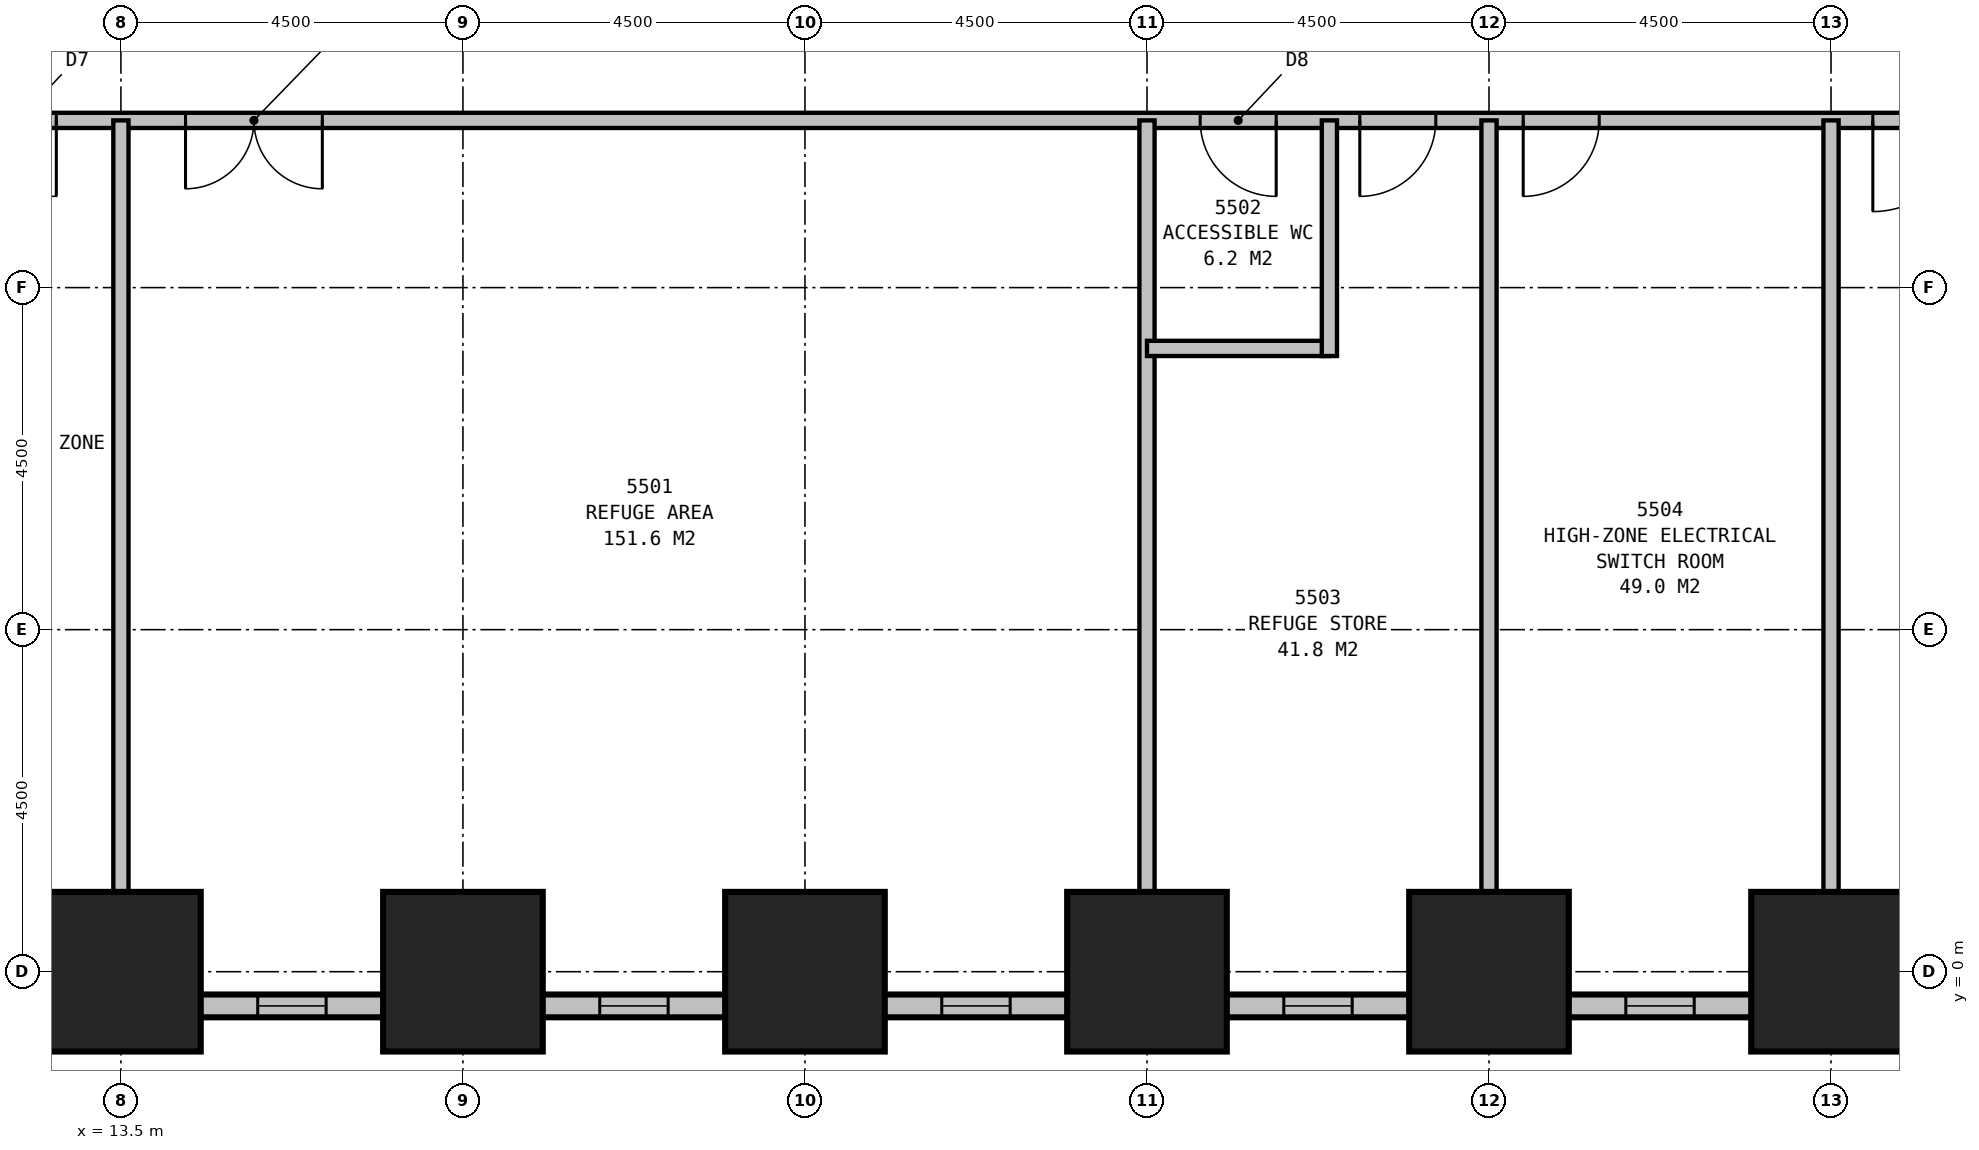
"""IFC4 building model, lengths in metres.
Left out: names, types, materials, properties, quantities, classifications, styles, units other than length and angle.
Written with IfcOpenShell. Run it as: python <this file> out.ifc"""

import sys

from ifc_helpers import new_model, si_unit, direction, frame, frame_2d, origin, origin_2d, place, context, subcontext, project, spatial, rectangle, extrude, element, fill, save


model = new_model("IFC4")
c1 = context("Model", 3, precision=1e-05, world=origin(), true_north=direction((0.0, 1.0)))
c2 = subcontext(c1, "Body", "Model", "MODEL_VIEW")
j1 = project(units=[si_unit("LENGTHUNIT", "METRE"), si_unit("PLANEANGLEUNIT", "RADIAN")], contexts=[c1])
p1 = place(None, origin())
s1 = spatial("IfcSite", under=j1, at=p1, CompositionType="ELEMENT")
p2 = place(p1, origin())
s2 = spatial("IfcBuilding", under=s1, at=p2, CompositionType="ELEMENT")
p3 = place(p2, frame((0.0, 0.0, 211.4)))
s3 = spatial("IfcBuildingStorey", under=s2, at=p3, CompositionType="ELEMENT", Elevation=211.4)
for number, where, z_axis, x_axis in (
    (1, (13.5, 0.0, 0.0), (0.0, 0.0, 1.0), (1.0, 0.0, 0.0)),
    (2, (18.0, 0.0, 0.0), (0.0, 0.0, 1.0), (1.0, 0.0, 0.0)),
    (3, (22.5, 0.0, 0.0), (0.0, 0.0, 1.0), (1.0, 0.0, 0.0)),
    (4, (27.0, 0.0, 0.0), (0.0, 0.0, 1.0), (1.0, 0.0, 0.0)),
    (5, (31.5, 0.0, 0.0), (0.0, 0.0, 1.0), (1.0, 0.0, 0.0)),
    (6, (36.0, 0.0, 0.0), (0.0, 0.0, 1.0), (1.0, 0.0, 0.0)),
):
    element("IfcColumn", number, at=place(p3, frame(where, z_axis=z_axis, x_axis=x_axis)), inside=s3, PredefinedType="COLUMN", context=c2, shape_type="SweptSolid", body=[
        extrude(rectangle(XDim=2.1, YDim=2.1, at=origin_2d()), origin(), (0.0, 0.0, 1.0), 6.0),
    ])
p4 = place(p3, frame((8.4, -0.45, 0.0), z_axis=(0.0, 0.0, 1.0), x_axis=(1.0, 0.0, 0.0)))
e7 = element("IfcWall", 7, at=p4, inside=s3, PredefinedType="STANDARD", context=c2, shape_type="SweptSolid", body=[
    extrude(rectangle(XDim=37.2, YDim=0.3, at=frame_2d((18.6, 0.0))), origin(), (0.0, 0.0, 1.0), 4.6),
])
p5 = place(p4, frame((2.4, 0.0, 0.5)))
e8 = element("IfcOpeningElement", 8, at=p5, cuts=e7, PredefinedType="OPENING", context=c2, shape_type="SweptSolid", body=[
    extrude(rectangle(XDim=0.9, YDim=1.2, at=frame_2d((0.45, 0.6))), frame((0.0, 0.16, 0.0), z_axis=(0.0, -1.0, 0.0), x_axis=(1.0, 0.0, 0.0)), (0.0, 0.0, 1.0), 0.32),
])
p6 = place(p4, frame((6.9, 0.0, 0.5)))
e9 = element("IfcOpeningElement", 9, at=p6, cuts=e7, PredefinedType="OPENING", context=c2, shape_type="SweptSolid", body=[
    extrude(rectangle(XDim=0.9, YDim=1.2, at=frame_2d((0.45, 0.6))), frame((0.0, 0.16, 0.0), z_axis=(0.0, -1.0, 0.0), x_axis=(1.0, 0.0, 0.0)), (0.0, 0.0, 1.0), 0.32),
])
p7 = place(p4, frame((11.4, 0.0, 0.5)))
e10 = element("IfcOpeningElement", 10, at=p7, cuts=e7, PredefinedType="OPENING", context=c2, shape_type="SweptSolid", body=[
    extrude(rectangle(XDim=0.9, YDim=1.2, at=frame_2d((0.45, 0.6))), frame((0.0, 0.16, 0.0), z_axis=(0.0, -1.0, 0.0), x_axis=(1.0, 0.0, 0.0)), (0.0, 0.0, 1.0), 0.32),
])
p8 = place(p4, frame((15.9, 0.0, 0.5)))
e11 = element("IfcOpeningElement", 11, at=p8, cuts=e7, PredefinedType="OPENING", context=c2, shape_type="SweptSolid", body=[
    extrude(rectangle(XDim=0.9, YDim=1.2, at=frame_2d((0.45, 0.6))), frame((0.0, 0.16, 0.0), z_axis=(0.0, -1.0, 0.0), x_axis=(1.0, 0.0, 0.0)), (0.0, 0.0, 1.0), 0.32),
])
p9 = place(p4, frame((20.4, 0.0, 0.5)))
e12 = element("IfcOpeningElement", 12, at=p9, cuts=e7, PredefinedType="OPENING", context=c2, shape_type="SweptSolid", body=[
    extrude(rectangle(XDim=0.9, YDim=1.2, at=frame_2d((0.45, 0.6))), frame((0.0, 0.16, 0.0), z_axis=(0.0, -1.0, 0.0), x_axis=(1.0, 0.0, 0.0)), (0.0, 0.0, 1.0), 0.32),
])
p10 = place(p4, frame((24.9, 0.0, 0.5)))
e13 = element("IfcOpeningElement", 13, at=p10, cuts=e7, PredefinedType="OPENING", context=c2, shape_type="SweptSolid", body=[
    extrude(rectangle(XDim=0.9, YDim=1.2, at=frame_2d((0.45, 0.6))), frame((0.0, 0.16, 0.0), z_axis=(0.0, -1.0, 0.0), x_axis=(1.0, 0.0, 0.0)), (0.0, 0.0, 1.0), 0.32),
])
p11 = place(p4, frame((29.4, 0.0, 0.5)))
e14 = element("IfcOpeningElement", 14, at=p11, cuts=e7, PredefinedType="OPENING", context=c2, shape_type="SweptSolid", body=[
    extrude(rectangle(XDim=0.9, YDim=1.2, at=frame_2d((0.45, 0.6))), frame((0.0, 0.16, 0.0), z_axis=(0.0, -1.0, 0.0), x_axis=(1.0, 0.0, 0.0)), (0.0, 0.0, 1.0), 0.32),
])
p12 = place(p4, frame((33.9, 0.0, 0.5)))
e15 = element("IfcOpeningElement", 15, at=p12, cuts=e7, PredefinedType="OPENING", context=c2, shape_type="SweptSolid", body=[
    extrude(rectangle(XDim=0.9, YDim=1.2, at=frame_2d((0.45, 0.6))), frame((0.0, 0.16, 0.0), z_axis=(0.0, -1.0, 0.0), x_axis=(1.0, 0.0, 0.0)), (0.0, 0.0, 1.0), 0.32),
])
p13 = place(p3, frame((11.2, 11.2, 0.0), z_axis=(0.0, 0.0, 1.0), x_axis=(1.0, 0.0, 0.0)))
e16 = element("IfcWall", 16, at=p13, inside=s3, PredefinedType="PARTITIONING", context=c2, shape_type="SweptSolid", body=[
    extrude(rectangle(XDim=27.1, YDim=0.2, at=frame_2d((13.55, 0.0))), origin(), (0.0, 0.0, 1.0), 5.75),
])
p14 = place(p13, frame((4.95, 0.0, 0.0), z_axis=(0.0, 0.0, 1.0), x_axis=(-1.0, 0.0, 0.0)))
e17 = element("IfcOpeningElement", 17, at=p14, cuts=e16, PredefinedType="OPENING", context=c2, shape_type="SweptSolid", body=[
    extrude(rectangle(XDim=1.8, YDim=2.4, at=frame_2d((0.9, 1.2))), frame((0.0, 0.11, 0.0), z_axis=(0.0, -1.0, 0.0), x_axis=(1.0, 0.0, 0.0)), (0.0, 0.0, 1.0), 0.22),
])
p15 = place(p13, frame((17.5, 0.0, 0.0), z_axis=(0.0, 0.0, 1.0), x_axis=(-1.0, 0.0, 0.0)))
e18 = element("IfcOpeningElement", 18, at=p15, cuts=e16, PredefinedType="OPENING", context=c2, shape_type="SweptSolid", body=[
    extrude(rectangle(XDim=1.0, YDim=2.1, at=frame_2d((0.5, 1.05))), frame((0.0, 0.11, 0.0), z_axis=(0.0, -1.0, 0.0), x_axis=(1.0, 0.0, 0.0)), (0.0, 0.0, 1.0), 0.22),
])
p16 = place(p13, frame((19.6, 0.0, 0.0), z_axis=(0.0, 0.0, 1.0), x_axis=(-1.0, 0.0, 0.0)))
e19 = element("IfcOpeningElement", 19, at=p16, cuts=e16, PredefinedType="OPENING", context=c2, shape_type="SweptSolid", body=[
    extrude(rectangle(XDim=1.0, YDim=2.1, at=frame_2d((0.5, 1.05))), frame((0.0, 0.11, 0.0), z_axis=(0.0, -1.0, 0.0), x_axis=(1.0, 0.0, 0.0)), (0.0, 0.0, 1.0), 0.22),
])
p17 = place(p13, frame((21.75, 0.0, 0.0), z_axis=(0.0, 0.0, 1.0), x_axis=(-1.0, 0.0, 0.0)))
e20 = element("IfcOpeningElement", 20, at=p17, cuts=e16, PredefinedType="OPENING", context=c2, shape_type="SweptSolid", body=[
    extrude(rectangle(XDim=1.0, YDim=2.1, at=frame_2d((0.5, 1.05))), frame((0.0, 0.11, 0.0), z_axis=(0.0, -1.0, 0.0), x_axis=(1.0, 0.0, 0.0)), (0.0, 0.0, 1.0), 0.22),
])
p18 = place(p13, frame((1.45, 0.0, 0.0), z_axis=(0.0, 0.0, 1.0), x_axis=(-1.0, 0.0, 0.0)))
e21 = element("IfcOpeningElement", 21, at=p18, cuts=e16, PredefinedType="OPENING", context=c2, shape_type="SweptSolid", body=[
    extrude(rectangle(XDim=1.0, YDim=2.1, at=frame_2d((0.5, 1.05))), frame((0.0, 0.11, 0.0), z_axis=(0.0, -1.0, 0.0), x_axis=(1.0, 0.0, 0.0)), (0.0, 0.0, 1.0), 0.22),
])
p19 = place(p13, frame((26.55, 0.0, 0.0), z_axis=(0.0, 0.0, 1.0), x_axis=(-1.0, 0.0, 0.0)))
e22 = element("IfcOpeningElement", 22, at=p19, cuts=e16, PredefinedType="OPENING", context=c2, shape_type="SweptSolid", body=[
    extrude(rectangle(XDim=1.2, YDim=2.1, at=frame_2d((0.6, 1.05))), frame((0.0, 0.11, 0.0), z_axis=(0.0, -1.0, 0.0), x_axis=(1.0, 0.0, 0.0)), (0.0, 0.0, 1.0), 0.22),
])
p20 = place(p3, frame((13.5, 11.2, 0.0), z_axis=(0.0, 0.0, 1.0), x_axis=(0.0, -1.0, 0.0)))
e23 = element("IfcWall", 23, at=p20, inside=s3, PredefinedType="PARTITIONING", context=c2, shape_type="SweptSolid", body=[
    extrude(rectangle(XDim=10.15, YDim=0.2, at=frame_2d((5.075, 0.0))), origin(), (0.0, 0.0, 1.0), 1.85),
])
p21 = place(p3, frame((27.0, 11.2, 0.0), z_axis=(0.0, 0.0, 1.0), x_axis=(0.0, -1.0, 0.0)))
e24 = element("IfcWall", 24, at=p21, inside=s3, PredefinedType="PARTITIONING", context=c2, shape_type="SweptSolid", body=[
    extrude(rectangle(XDim=10.15, YDim=0.2, at=frame_2d((5.075, 0.0))), origin(), (0.0, 0.0, 1.0), 2.15),
])
for number, where, z_axis, x_axis in (
    (25, (31.5, 11.2, 0.0), (0.0, 0.0, 1.0), (0.0, -1.0, 0.0)),
    (26, (36.0, 11.2, 0.0), (0.0, 0.0, 1.0), (0.0, -1.0, 0.0)),
):
    element("IfcWall", number, at=place(p3, frame(where, z_axis=z_axis, x_axis=x_axis)), inside=s3, PredefinedType="PARTITIONING", context=c2, shape_type="SweptSolid", body=[
        extrude(rectangle(XDim=10.15, YDim=0.2, at=frame_2d((5.075, 0.0))), origin(), (0.0, 0.0, 1.0), 4.75),
    ])
p22 = place(p3, frame((29.4, 11.2, 0.0), z_axis=(0.0, 0.0, 1.0), x_axis=(0.0, -1.0, 0.0)))
e27 = element("IfcWall", 27, at=p22, inside=s3, PredefinedType="PARTITIONING", context=c2, shape_type="SweptSolid", body=[
    extrude(rectangle(XDim=3.1, YDim=0.2, at=frame_2d((1.55, 0.0))), origin(), (0.0, 0.0, 1.0), 5.75),
])
p23 = place(p3, frame((27.0, 8.2, 0.0), z_axis=(0.0, 0.0, 1.0), x_axis=(1.0, 0.0, 0.0)))
e28 = element("IfcWall", 28, at=p23, inside=s3, PredefinedType="PARTITIONING", context=c2, shape_type="SweptSolid", body=[
    extrude(rectangle(XDim=2.4, YDim=0.2, at=frame_2d((1.2, 0.0))), origin(), (0.0, 0.0, 1.0), 5.75),
])
p24 = place(p6, origin())
e29 = element("IfcWindow", 29, at=p24, inside=s3, PartitioningType="SINGLE_PANEL", PredefinedType="USERDEFINED", context=c2, shape_type="SweptSolid", body=[
    extrude(rectangle(XDim=0.9, YDim=1.2, at=frame_2d((0.45, 0.6))), frame((0.0, 0.03, 0.0), z_axis=(0.0, -1.0, 0.0), x_axis=(1.0, 0.0, 0.0)), (0.0, 0.0, 1.0), 0.06),
])
fill(e9, e29)
p25 = place(p7, origin())
e30 = element("IfcWindow", 30, at=p25, inside=s3, PartitioningType="SINGLE_PANEL", PredefinedType="USERDEFINED", context=c2, shape_type="SweptSolid", body=[
    extrude(rectangle(XDim=0.9, YDim=1.2, at=frame_2d((0.45, 0.6))), frame((0.0, 0.03, 0.0), z_axis=(0.0, -1.0, 0.0), x_axis=(1.0, 0.0, 0.0)), (0.0, 0.0, 1.0), 0.06),
])
fill(e10, e30)
p26 = place(p8, origin())
e31 = element("IfcWindow", 31, at=p26, inside=s3, PartitioningType="SINGLE_PANEL", PredefinedType="USERDEFINED", context=c2, shape_type="SweptSolid", body=[
    extrude(rectangle(XDim=0.9, YDim=1.2, at=frame_2d((0.45, 0.6))), frame((0.0, 0.03, 0.0), z_axis=(0.0, -1.0, 0.0), x_axis=(1.0, 0.0, 0.0)), (0.0, 0.0, 1.0), 0.06),
])
fill(e11, e31)
p27 = place(p9, origin())
e32 = element("IfcWindow", 32, at=p27, inside=s3, PartitioningType="SINGLE_PANEL", PredefinedType="USERDEFINED", context=c2, shape_type="SweptSolid", body=[
    extrude(rectangle(XDim=0.9, YDim=1.2, at=frame_2d((0.45, 0.6))), frame((0.0, 0.03, 0.0), z_axis=(0.0, -1.0, 0.0), x_axis=(1.0, 0.0, 0.0)), (0.0, 0.0, 1.0), 0.06),
])
fill(e12, e32)
p28 = place(p10, origin())
e33 = element("IfcWindow", 33, at=p28, inside=s3, PartitioningType="SINGLE_PANEL", PredefinedType="USERDEFINED", context=c2, shape_type="SweptSolid", body=[
    extrude(rectangle(XDim=0.9, YDim=1.2, at=frame_2d((0.45, 0.6))), frame((0.0, 0.03, 0.0), z_axis=(0.0, -1.0, 0.0), x_axis=(1.0, 0.0, 0.0)), (0.0, 0.0, 1.0), 0.06),
])
fill(e13, e33)
p29 = place(p14, origin())
e34 = element("IfcDoor", 34, at=p29, inside=s3, OperationType="DOUBLE_DOOR_SINGLE_SWING", PredefinedType="DOOR", context=c2, shape_type="SweptSolid", body=[
    extrude(rectangle(XDim=1.8, YDim=2.4, at=frame_2d((0.9, 1.2))), frame((0.0, 0.025, 0.0), z_axis=(0.0, -1.0, 0.0), x_axis=(1.0, 0.0, 0.0)), (0.0, 0.0, 1.0), 0.05),
])
fill(e17, e34)
p30 = place(p15, origin())
e35 = element("IfcDoor", 35, at=p30, inside=s3, OperationType="SINGLE_SWING_LEFT", PredefinedType="DOOR", context=c2, shape_type="SweptSolid", body=[
    extrude(rectangle(XDim=1.0, YDim=2.1, at=frame_2d((0.5, 1.05))), frame((0.0, 0.025, 0.0), z_axis=(0.0, -1.0, 0.0), x_axis=(1.0, 0.0, 0.0)), (0.0, 0.0, 1.0), 0.05),
])
fill(e18, e35)
p31 = place(p16, origin())
e36 = element("IfcDoor", 36, at=p31, inside=s3, OperationType="SINGLE_SWING_RIGHT", PredefinedType="DOOR", context=c2, shape_type="SweptSolid", body=[
    extrude(rectangle(XDim=1.0, YDim=2.1, at=frame_2d((0.5, 1.05))), frame((0.0, 0.025, 0.0), z_axis=(0.0, -1.0, 0.0), x_axis=(1.0, 0.0, 0.0)), (0.0, 0.0, 1.0), 0.05),
])
fill(e19, e36)
p32 = place(p17, origin())
e37 = element("IfcDoor", 37, at=p32, inside=s3, OperationType="SINGLE_SWING_RIGHT", PredefinedType="DOOR", context=c2, shape_type="SweptSolid", body=[
    extrude(rectangle(XDim=1.0, YDim=2.1, at=frame_2d((0.5, 1.05))), frame((0.0, 0.025, 0.0), z_axis=(0.0, -1.0, 0.0), x_axis=(1.0, 0.0, 0.0)), (0.0, 0.0, 1.0), 0.05),
])
fill(e20, e37)
p33 = place(p18, origin())
e38 = element("IfcDoor", 38, at=p33, inside=s3, OperationType="SINGLE_SWING_LEFT", PredefinedType="DOOR", context=c2, shape_type="SweptSolid", body=[
    extrude(rectangle(XDim=1.0, YDim=2.1, at=frame_2d((0.5, 1.05))), frame((0.0, 0.025, 0.0), z_axis=(0.0, -1.0, 0.0), x_axis=(1.0, 0.0, 0.0)), (0.0, 0.0, 1.0), 0.05),
])
fill(e21, e38)
p34 = place(p19, origin())
e39 = element("IfcDoor", 39, at=p34, inside=s3, OperationType="SINGLE_SWING_RIGHT", PredefinedType="DOOR", context=c2, shape_type="SweptSolid", body=[
    extrude(rectangle(XDim=1.2, YDim=2.1, at=frame_2d((0.6, 1.05))), frame((0.0, 0.025, 0.0), z_axis=(0.0, -1.0, 0.0), x_axis=(1.0, 0.0, 0.0)), (0.0, 0.0, 1.0), 0.05),
])
fill(e22, e39)
save(model, sys.argv[1])
